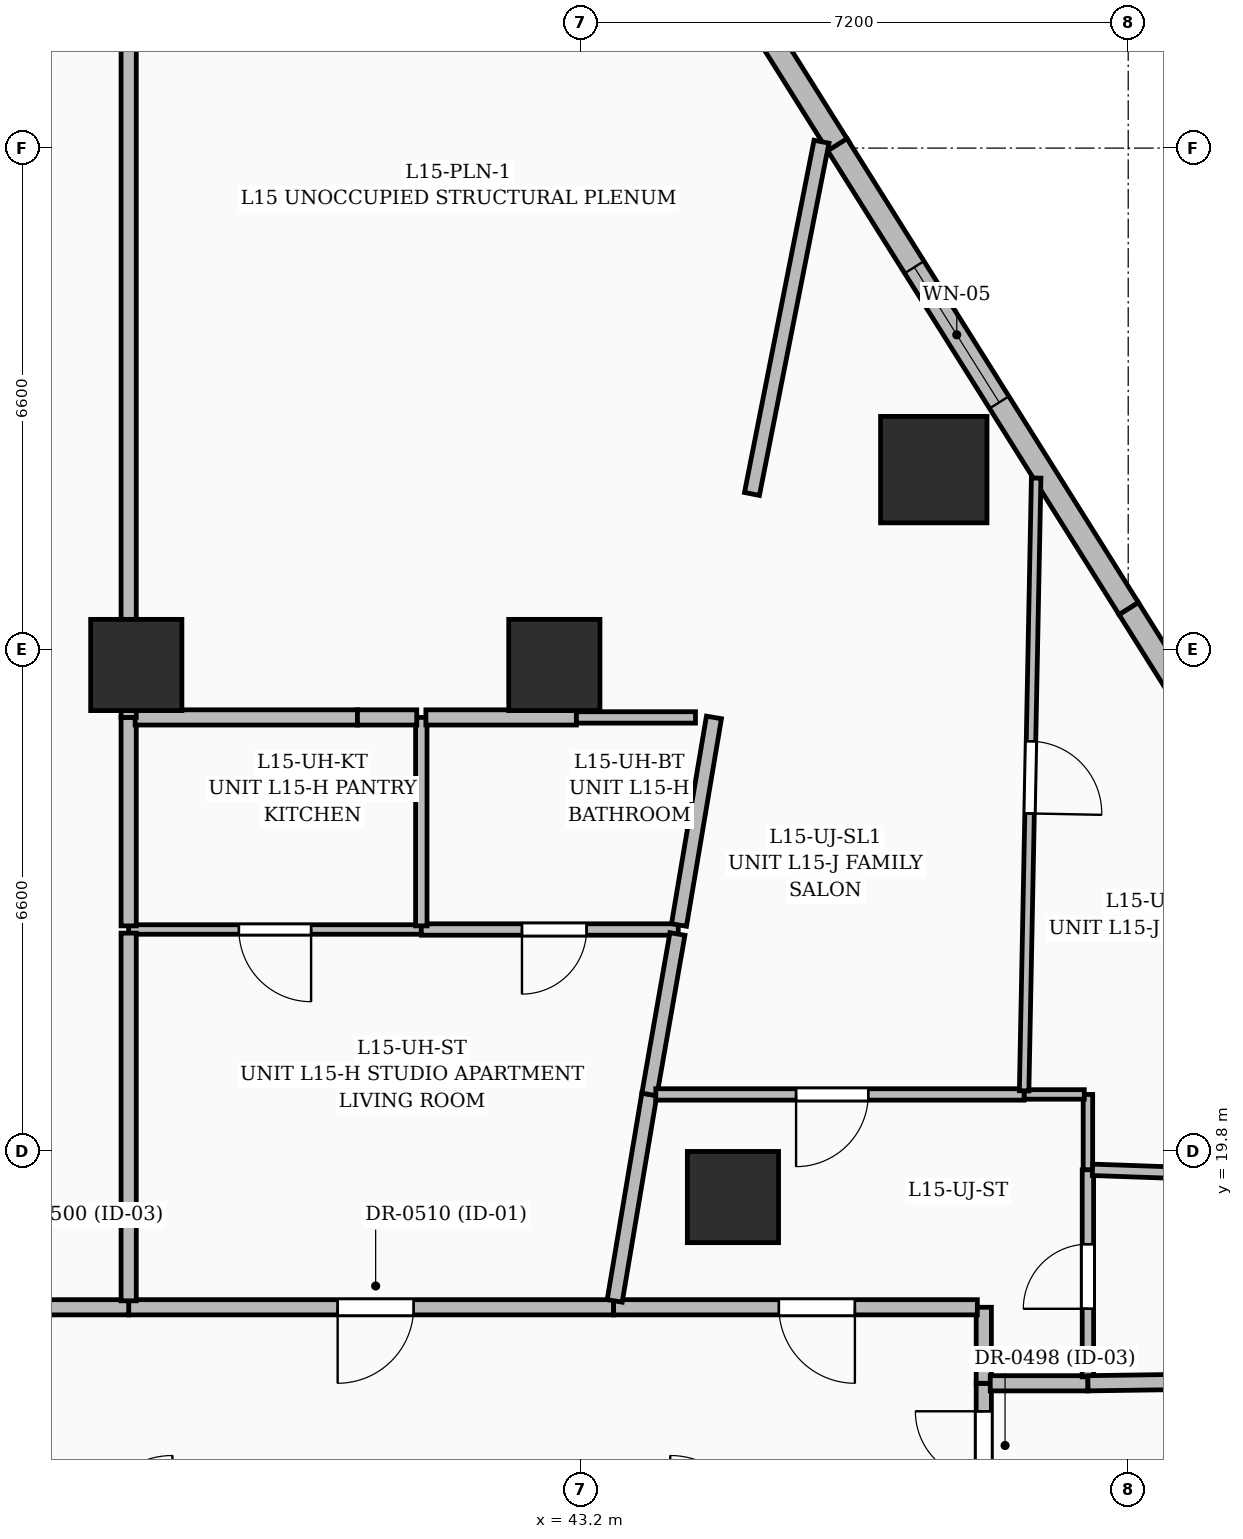
"""IFC4 building model, lengths in metres.
Left out: names, types, materials, properties, quantities, classifications, styles, units other than length and angle.
Written with IfcOpenShell. Run it as: python <this file> out.ifc"""

import sys

from ifc_helpers import new_model, si_unit, direction, frame, frame_2d, origin, origin_2d, place, context, subcontext, project, spatial, rectangle, extrude, element, fill, save


model = new_model("IFC4")
c1 = context("Model", 3, precision=1e-05, world=origin(), true_north=direction((0.0, 1.0)))
c2 = subcontext(c1, "Body", "Model", "MODEL_VIEW")
j1 = project(units=[si_unit("LENGTHUNIT", "METRE"), si_unit("PLANEANGLEUNIT", "RADIAN")], contexts=[c1])
p1 = place(None, origin())
s1 = spatial("IfcSite", under=j1, at=p1, CompositionType="ELEMENT")
p2 = place(p1, origin())
s2 = spatial("IfcBuilding", under=s1, at=p2, CompositionType="ELEMENT")
p3 = place(p2, frame((0.0, 0.0, 64.2)))
s3 = spatial("IfcBuildingStorey", under=s2, at=p3, CompositionType="ELEMENT", Elevation=64.2)
for number, where, z_axis, x_axis in (
    (1, (45.2, 19.2, 0.0), (0.0, 0.0, 1.0), (1.0, 0.0, 0.0)),
    (2, (42.85, 26.2, 0.0), (0.0, 0.0, 1.0), (1.0, 0.0, 0.0)),
    (3, (37.35, 26.2, 0.0), (0.0, 0.0, 1.0), (1.0, 0.0, 0.0)),
):
    element("IfcColumn", number, at=place(p3, frame(where, z_axis=z_axis, x_axis=x_axis)), inside=s3, PredefinedType="COLUMN", context=c2, shape_type="SweptSolid", body=[
        extrude(rectangle(XDim=1.2, YDim=1.2, at=origin_2d()), origin(), (0.0, 0.0, 1.0), 3.6),
    ])
p4 = place(p3, frame((47.842, 28.77, 0.0), z_axis=(0.0, 0.0, 1.0), x_axis=(1.0, 0.0, 0.0)))
e4 = element("IfcColumn", 4, at=p4, inside=s3, PredefinedType="COLUMN", context=c2, shape_type="SweptSolid", body=[
    extrude(rectangle(XDim=1.4, YDim=1.4, at=origin_2d()), origin(), (0.0, 0.0, 1.0), 3.6),
])
p5 = place(p3, frame((42.797, 39.058, 0.0), z_axis=(0.0, 0.0, 1.0), x_axis=(0.531893353762, -0.846811348663, 0.0)))
e5 = element("IfcWall", 5, at=p5, inside=s3, PredefinedType="SOLIDWALL", context=c2, shape_type="SweptSolid", body=[
    extrude(rectangle(XDim=7.154, YDim=0.3, at=frame_2d((3.577, 0.0))), origin(), (0.0, 0.0, 1.0), 3.35),
])
p6 = place(p5, frame((2.825, 0.0, 0.6)))
e6 = element("IfcOpeningElement", 6, at=p6, cuts=e5, PredefinedType="OPENING", context=c2, shape_type="SweptSolid", body=[
    extrude(rectangle(XDim=2.4, YDim=2.1, at=frame_2d((1.2, 1.05))), frame((0.0, 0.16, 0.0), z_axis=(0.0, -1.0, 0.0), x_axis=(1.0, 0.0, 0.0)), (0.0, 0.0, 1.0), 0.32),
])
p7 = place(p3, frame((46.574, 33.044, 0.0), z_axis=(0.0, 0.0, 1.0), x_axis=(0.531903730452, -0.846804830839, 0.0)))
e7 = element("IfcWall", 7, at=p7, inside=s3, PredefinedType="SOLIDWALL", context=c2, shape_type="SweptSolid", body=[
    extrude(rectangle(XDim=7.207, YDim=0.3, at=frame_2d((3.604, 0.0))), origin(), (0.0, 0.0, 1.0), 3.35),
])
p8 = place(p7, frame((1.903, 0.0, 0.55)))
e8 = element("IfcOpeningElement", 8, at=p8, cuts=e7, PredefinedType="OPENING", context=c2, shape_type="SweptSolid", body=[
    extrude(rectangle(XDim=2.1, YDim=2.4, at=frame_2d((1.05, 1.2))), frame((0.0, 0.16, 0.0), z_axis=(0.0, -1.0, 0.0), x_axis=(1.0, 0.0, 0.0)), (0.0, 0.0, 1.0), 0.32),
])
p9 = place(p3, frame((50.407, 26.941, 0.0), z_axis=(0.0, 0.0, 1.0), x_axis=(0.531893353762, -0.846811348663, 0.0)))
e9 = element("IfcWall", 9, at=p9, inside=s3, PredefinedType="SOLIDWALL", context=c2, shape_type="SweptSolid", body=[
    extrude(rectangle(XDim=7.154, YDim=0.3, at=frame_2d((3.577, 0.0))), origin(), (0.0, 0.0, 1.0), 3.35),
])
p10 = place(p9, frame((2.625, 0.0, 0.6)))
e10 = element("IfcOpeningElement", 10, at=p10, cuts=e9, PredefinedType="OPENING", context=c2, shape_type="SweptSolid", body=[
    extrude(rectangle(XDim=1.8, YDim=2.1, at=frame_2d((0.9, 1.05))), frame((0.0, 0.16, 0.0), z_axis=(0.0, -1.0, 0.0), x_axis=(1.0, 0.0, 0.0)), (0.0, 0.0, 1.0), 0.32),
])
p11 = place(p3, frame((48.5, 14.285, 0.0), z_axis=(0.0, 0.0, 1.0), x_axis=(0.0, 1.0, 0.0)))
e11 = element("IfcWall", 11, at=p11, inside=s3, PredefinedType="PARTITIONING", context=c2, shape_type="SweptSolid", body=[
    extrude(rectangle(XDim=2.465, YDim=0.2, at=frame_2d((1.232, 0.0))), origin(), (0.0, 0.0, 1.0), 2.279),
])
p12 = place(p11, frame((1.197, 0.0, 0.0)))
e12 = element("IfcOpeningElement", 12, at=p12, cuts=e11, PredefinedType="OPENING", context=c2, shape_type="SweptSolid", body=[
    extrude(rectangle(XDim=0.9, YDim=2.1, at=frame_2d((0.45, 1.05))), frame((0.0, 0.11, 0.0), z_axis=(0.0, -1.0, 0.0), x_axis=(1.0, 0.0, 0.0)), (0.0, 0.0, 1.0), 0.22),
])
p13 = place(p3, frame((43.63, 17.75, 0.0), z_axis=(0.0, 0.0, 1.0), x_axis=(-1.0, 0.0, 0.0)))
e13 = element("IfcWall", 13, at=p13, inside=s3, PredefinedType="PARTITIONING", context=c2, shape_type="SweptSolid", body=[
    extrude(rectangle(XDim=6.38, YDim=0.2, at=frame_2d((3.19, 0.0))), origin(), (0.0, 0.0, 1.0), 3.35),
])
p14 = place(p13, frame((2.631, 0.0, 0.0)))
e14 = element("IfcOpeningElement", 14, at=p14, cuts=e13, PredefinedType="OPENING", context=c2, shape_type="SweptSolid", body=[
    extrude(rectangle(XDim=1.0, YDim=2.2, at=frame_2d((0.5, 1.1))), frame((0.0, 0.11, 0.0), z_axis=(0.0, -1.0, 0.0), x_axis=(1.0, 0.0, 0.0)), (0.0, 0.0, 1.0), 0.22),
])
p15 = place(p3, frame((48.5, 16.75, 0.0), z_axis=(0.0, 0.0, 1.0), x_axis=(0.0, 1.0, 0.0)))
e15 = element("IfcWall", 15, at=p15, inside=s3, PredefinedType="PARTITIONING", context=c2, shape_type="SweptSolid", body=[
    extrude(rectangle(XDim=1.0, YDim=0.2, at=frame_2d((0.5, 0.0))), origin(), (0.0, 0.0, 1.0), 2.279),
])
p16 = place(p3, frame((48.415, 17.75, 0.0), z_axis=(0.0, 0.0, 1.0), x_axis=(-1.0, 0.0, 0.0)))
e16 = element("IfcWall", 16, at=p16, inside=s3, PredefinedType="PARTITIONING", context=c2, shape_type="SweptSolid", body=[
    extrude(rectangle(XDim=4.785, YDim=0.2, at=frame_2d((2.393, 0.0))), origin(), (0.0, 0.0, 1.0), 2.309),
])
p17 = place(p16, frame((1.611, 0.0, 0.0)))
e17 = element("IfcOpeningElement", 17, at=p17, cuts=e16, PredefinedType="OPENING", context=c2, shape_type="SweptSolid", body=[
    extrude(rectangle(XDim=1.0, YDim=2.2, at=frame_2d((0.5, 1.1))), frame((0.0, 0.11, 0.0), z_axis=(0.0, -1.0, 0.0), x_axis=(1.0, 0.0, 0.0)), (0.0, 0.0, 1.0), 0.22),
])
p18 = place(p3, frame((37.25, 17.75, 0.0), z_axis=(0.0, 0.0, 1.0), x_axis=(-1.0, 0.0, 0.0)))
e18 = element("IfcWall", 18, at=p18, inside=s3, PredefinedType="PARTITIONING", context=c2, shape_type="SweptSolid", body=[
    extrude(rectangle(XDim=3.19, YDim=0.2, at=frame_2d((1.595, 0.0))), origin(), (0.0, 0.0, 1.0), 2.309),
])
p19 = place(p18, frame((1.086, 0.0, 0.0)))
e19 = element("IfcOpeningElement", 19, at=p19, cuts=e18, PredefinedType="OPENING", context=c2, shape_type="SweptSolid", body=[
    extrude(rectangle(XDim=0.9, YDim=2.1, at=frame_2d((0.45, 1.05))), frame((0.0, 0.11, 0.0), z_axis=(0.0, -1.0, 0.0), x_axis=(1.0, 0.0, 0.0)), (0.0, 0.0, 1.0), 0.22),
])
p20 = place(p3, frame((49.87, 16.75, 0.0), z_axis=(0.0, 0.0, 1.0), x_axis=(-1.0, 0.0, 0.0)))
e20 = element("IfcWall", 20, at=p20, inside=s3, PredefinedType="PARTITIONING", context=c2, shape_type="SweptSolid", body=[
    extrude(rectangle(XDim=1.285, YDim=0.2, at=frame_2d((0.643, 0.0))), origin(), (0.0, 0.0, 1.0), 2.279),
])
p21 = place(p3, frame((41.1, 22.72, 0.0), z_axis=(0.0, 0.0, 1.0), x_axis=(-1.0, 0.0, 0.0)))
e21 = element("IfcWall", 21, at=p21, inside=s3, PredefinedType="PARTITIONING", context=c2, shape_type="SweptSolid", body=[
    extrude(rectangle(XDim=3.85, YDim=0.125, at=frame_2d((1.925, 0.0))), origin(), (0.0, 0.0, 1.0), 3.35),
])
p22 = place(p21, frame((1.45, 0.0, 0.0)))
e22 = element("IfcOpeningElement", 22, at=p22, cuts=e21, PredefinedType="OPENING", context=c2, shape_type="SweptSolid", body=[
    extrude(rectangle(XDim=0.95, YDim=2.2, at=frame_2d((0.475, 1.1))), frame((0.0, 0.072, 0.0), z_axis=(0.0, -1.0, 0.0), x_axis=(1.0, 0.0, 0.0)), (0.0, 0.0, 1.0), 0.145),
])
p23 = place(p3, frame((44.48, 22.72, 0.0), z_axis=(0.0, 0.0, 1.0), x_axis=(-1.0, 0.0, 0.0)))
e23 = element("IfcWall", 23, at=p23, inside=s3, PredefinedType="PARTITIONING", context=c2, shape_type="SweptSolid", body=[
    extrude(rectangle(XDim=3.38, YDim=0.15, at=frame_2d((1.69, 0.0))), origin(), (0.0, 0.0, 1.0), 2.309),
])
p24 = place(p23, frame((1.206, 0.0, 0.0)))
e24 = element("IfcOpeningElement", 24, at=p24, cuts=e23, PredefinedType="OPENING", context=c2, shape_type="SweptSolid", body=[
    extrude(rectangle(XDim=0.85, YDim=2.1, at=frame_2d((0.425, 1.05))), frame((0.0, 0.085, 0.0), z_axis=(0.0, -1.0, 0.0), x_axis=(1.0, 0.0, 0.0)), (0.0, 0.0, 1.0), 0.17),
])
p25 = place(p3, frame((43.644, 17.834, 0.0), z_axis=(0.0, 0.0, 1.0), x_axis=(0.165577528193, 0.986196776591, 0.0)))
e25 = element("IfcWall", 25, at=p25, inside=s3, PredefinedType="PARTITIONING", context=c2, shape_type="SweptSolid", body=[
    extrude(rectangle(XDim=2.754, YDim=0.2, at=frame_2d((1.377, 0.0))), origin(), (0.0, 0.0, 1.0), 3.35),
])
p26 = place(p3, frame((44.1, 20.55, 0.0), z_axis=(0.0, 0.0, 1.0), x_axis=(0.17248534527, 0.985012084021, 0.0)))
e26 = element("IfcWall", 26, at=p26, inside=s3, PredefinedType="PARTITIONING", context=c2, shape_type="SweptSolid", body=[
    extrude(rectangle(XDim=2.143, YDim=0.2, at=frame_2d((1.072, 0.0))), origin(), (0.0, 0.0, 1.0), 2.309),
])
p27 = place(p3, frame((37.25, 22.673, 0.0), z_axis=(0.0, 0.0, 1.0), x_axis=(0.0, -1.0, 0.0)))
e27 = element("IfcWall", 27, at=p27, inside=s3, PredefinedType="PARTITIONING", context=c2, shape_type="SweptSolid", body=[
    extrude(rectangle(XDim=4.838, YDim=0.2, at=frame_2d((2.419, 0.0))), origin(), (0.0, 0.0, 1.0), 3.35),
])
p28 = place(p3, frame((41.1, 22.768, 0.0), z_axis=(0.0, 0.0, 1.0), x_axis=(0.0, 1.0, 0.0)))
e28 = element("IfcWall", 28, at=p28, inside=s3, PredefinedType="PARTITIONING", context=c2, shape_type="SweptSolid", body=[
    extrude(rectangle(XDim=2.742, YDim=0.15, at=frame_2d((1.371, 0.0))), origin(), (0.0, 0.0, 1.0), 3.35),
])
p29 = place(p3, frame((37.25, 25.51, 0.0), z_axis=(0.0, 0.0, 1.0), x_axis=(0.0, -1.0, 0.0)))
e29 = element("IfcWall", 29, at=p29, inside=s3, PredefinedType="PARTITIONING", context=c2, shape_type="SweptSolid", body=[
    extrude(rectangle(XDim=2.742, YDim=0.2, at=frame_2d((1.371, 0.0))), origin(), (0.0, 0.0, 1.0), 2.309),
])
p30 = place(p3, frame((40.26, 25.51, 0.0), z_axis=(0.0, 0.0, 1.0), x_axis=(-1.0, 0.0, 0.0)))
e30 = element("IfcWall", 30, at=p30, inside=s3, PredefinedType="PARTITIONING", context=c2, shape_type="SweptSolid", body=[
    extrude(rectangle(XDim=2.925, YDim=0.2, at=frame_2d((1.462, 0.0))), origin(), (0.0, 0.0, 1.0), 3.35),
])
p31 = place(p3, frame((44.49, 22.779, 0.0), z_axis=(0.0, 0.0, 1.0), x_axis=(0.166100060311, 0.986108903704, 0.0)))
e31 = element("IfcWall", 31, at=p31, inside=s3, PredefinedType="PARTITIONING", context=c2, shape_type="SweptSolid", body=[
    extrude(rectangle(XDim=2.769, YDim=0.2, at=frame_2d((1.385, 0.0))), origin(), (0.0, 0.0, 1.0), 3.35),
])
p32 = place(p3, frame((43.14, 25.51, 0.0), z_axis=(0.0, 0.0, 1.0), x_axis=(-1.0, 0.0, 0.0)))
e32 = element("IfcWall", 32, at=p32, inside=s3, PredefinedType="PARTITIONING", context=c2, shape_type="SweptSolid", body=[
    extrude(rectangle(XDim=1.98, YDim=0.2, at=frame_2d((0.99, 0.0))), origin(), (0.0, 0.0, 1.0), 2.309),
])
p33 = place(p3, frame((49.87, 16.835, 0.0), z_axis=(0.0, 0.0, 1.0), x_axis=(0.0, 1.0, 0.0)))
e33 = element("IfcWall", 33, at=p33, inside=s3, PredefinedType="PARTITIONING", context=c2, shape_type="SweptSolid", body=[
    extrude(rectangle(XDim=2.725, YDim=0.15, at=frame_2d((1.363, 0.0))), origin(), (0.0, 0.0, 1.0), 2.279),
])
p34 = place(p33, frame((0.895, 0.0, 0.0)))
e34 = element("IfcOpeningElement", 34, at=p34, cuts=e33, PredefinedType="OPENING", context=c2, shape_type="SweptSolid", body=[
    extrude(rectangle(XDim=0.85, YDim=2.1, at=frame_2d((0.425, 1.05))), frame((0.0, 0.085, 0.0), z_axis=(0.0, -1.0, 0.0), x_axis=(1.0, 0.0, 0.0)), (0.0, 0.0, 1.0), 0.17),
])
p35 = place(p3, frame((49.87, 19.56, 0.0), z_axis=(0.0, 0.0, 1.0), x_axis=(0.0, 1.0, 0.0)))
e35 = element("IfcWall", 35, at=p35, inside=s3, PredefinedType="PARTITIONING", context=c2, shape_type="SweptSolid", body=[
    extrude(rectangle(XDim=0.99, YDim=0.125, at=frame_2d((0.495, 0.0))), origin(), (0.0, 0.0, 1.0), 3.35),
])
p36 = place(p3, frame((49.823, 20.55, 0.0), z_axis=(0.0, 0.0, 1.0), x_axis=(-1.0, 0.0, 0.0)))
e36 = element("IfcWall", 36, at=p36, inside=s3, PredefinedType="PARTITIONING", context=c2, shape_type="SweptSolid", body=[
    extrude(rectangle(XDim=0.792, YDim=0.125, at=frame_2d((0.396, 0.0))), origin(), (0.0, 0.0, 1.0), 3.35),
])
p37 = place(p3, frame((49.03, 20.55, 0.0), z_axis=(0.0, 0.0, 1.0), x_axis=(-1.0, 0.0, 0.0)))
e37 = element("IfcWall", 37, at=p37, inside=s3, PredefinedType="PARTITIONING", context=c2, shape_type="SweptSolid", body=[
    extrude(rectangle(XDim=4.845, YDim=0.15, at=frame_2d((2.422, 0.0))), origin(), (0.0, 0.0, 1.0), 2.279),
])
p38 = place(p37, frame((2.05, 0.0, 0.0)))
e38 = element("IfcOpeningElement", 38, at=p38, cuts=e37, PredefinedType="OPENING", context=c2, shape_type="SweptSolid", body=[
    extrude(rectangle(XDim=0.95, YDim=2.2, at=frame_2d((0.475, 1.1))), frame((0.0, 0.085, 0.0), z_axis=(0.0, -1.0, 0.0), x_axis=(1.0, 0.0, 0.0)), (0.0, 0.0, 1.0), 0.17),
])
p39 = place(p3, frame((52.861, 19.456, 0.0), z_axis=(0.0, 0.0, 1.0), x_axis=(-0.999391578041, 0.034877983608, 0.0)))
e39 = element("IfcWall", 39, at=p39, inside=s3, PredefinedType="PARTITIONING", context=c2, shape_type="SweptSolid", body=[
    extrude(rectangle(XDim=2.933, YDim=0.15, at=frame_2d((1.466, 0.0))), origin(), (0.0, 0.0, 1.0), 2.279),
])
p40 = place(p3, frame((49.189, 28.659, 0.0), z_axis=(0.0, 0.0, 1.0), x_axis=(-0.019620692223, -0.999807495689, 0.0)))
e40 = element("IfcWall", 40, at=p40, inside=s3, PredefinedType="PARTITIONING", context=c2, shape_type="SweptSolid", body=[
    extrude(rectangle(XDim=8.063, YDim=0.125, at=frame_2d((4.031, 0.0))), origin(), (0.0, 0.0, 1.0), 2.37),
])
p41 = place(p40, frame((3.463, 0.0, 0.0)))
e41 = element("IfcOpeningElement", 41, at=p41, cuts=e40, PredefinedType="OPENING", context=c2, shape_type="SweptSolid", body=[
    extrude(rectangle(XDim=0.95, YDim=2.2, at=frame_2d((0.475, 1.1))), frame((0.0, 0.072, 0.0), z_axis=(0.0, -1.0, 0.0), x_axis=(1.0, 0.0, 0.0)), (0.0, 0.0, 1.0), 0.145),
])
p42 = place(p3, frame((46.365, 33.084, 0.0), z_axis=(0.0, 0.0, 1.0), x_axis=(-0.193720090738, -0.981056841597, 0.0)))
e42 = element("IfcWall", 42, at=p42, inside=s3, PredefinedType="PARTITIONING", context=c2, shape_type="SweptSolid", body=[
    extrude(rectangle(XDim=4.724, YDim=0.2, at=frame_2d((2.362, 0.0))), origin(), (0.0, 0.0, 1.0), 2.37),
])
p43 = place(p3, frame((37.25, 25.51, 0.0), z_axis=(0.0, 0.0, 1.0), x_axis=(0.0, 1.0, 0.0)))
e43 = element("IfcWall", 43, at=p43, inside=s3, PredefinedType="PARTITIONING", context=c2, shape_type="SweptSolid", body=[
    extrude(rectangle(XDim=12.14, YDim=0.2, at=frame_2d((6.07, 0.0))), origin(), (0.0, 0.0, 1.0), 2.279),
])
p44 = place(p3, frame((56.593, 16.846, 0.0), z_axis=(0.0, 0.0, 1.0), x_axis=(-0.999898174742, -0.014270253937, 0.0)))
e44 = element("IfcWall", 44, at=p44, inside=s3, PredefinedType="PARTITIONING", context=c2, shape_type="SweptSolid", body=[
    extrude(rectangle(XDim=6.724, YDim=0.2, at=frame_2d((3.362, 0.0))), origin(), (0.0, 0.0, 1.0), 2.37),
])
p45 = place(p3, frame((41.04, 25.51, 0.0), z_axis=(0.0, 0.0, 1.0), x_axis=(-1.0, 0.0, 0.0)))
e45 = element("IfcWall", 45, at=p45, inside=s3, PredefinedType="PARTITIONING", context=c2, shape_type="SweptSolid", body=[
    extrude(rectangle(XDim=0.78, YDim=0.2, at=frame_2d((0.39, 0.0))), origin(), (0.0, 0.0, 1.0), 3.35),
])
p46 = place(p3, frame((44.707, 25.51, 0.0), z_axis=(0.0, 0.0, 1.0), x_axis=(-1.0, 0.0, 0.0)))
e46 = element("IfcWall", 46, at=p46, inside=s3, PredefinedType="PARTITIONING", context=c2, shape_type="SweptSolid", body=[
    extrude(rectangle(XDim=1.567, YDim=0.15, at=frame_2d((0.784, 0.0))), origin(), (0.0, 0.0, 1.0), 2.309),
])
p47 = place(p8, origin())
e47 = element("IfcWindow", 47, at=p47, inside=s3, PartitioningType="SINGLE_PANEL", PredefinedType="WINDOW", context=c2, shape_type="SweptSolid", body=[
    extrude(rectangle(XDim=2.1, YDim=2.4, at=frame_2d((1.05, 1.2))), frame((0.0, 0.03, 0.0), z_axis=(0.0, -1.0, 0.0), x_axis=(1.0, 0.0, 0.0)), (0.0, 0.0, 1.0), 0.06),
])
fill(e8, e47)
p48 = place(p12, origin())
e48 = element("IfcDoor", 48, at=p48, inside=s3, OperationType="SINGLE_SWING_RIGHT", PredefinedType="DOOR", context=c2, shape_type="SweptSolid", body=[
    extrude(rectangle(XDim=0.9, YDim=2.1, at=frame_2d((0.45, 1.05))), frame((0.0, 0.025, 0.0), z_axis=(0.0, -1.0, 0.0), x_axis=(1.0, 0.0, 0.0)), (0.0, 0.0, 1.0), 0.05),
])
fill(e12, e48)
p49 = place(p14, origin())
e49 = element("IfcDoor", 49, at=p49, inside=s3, OperationType="SINGLE_SWING_RIGHT", PredefinedType="DOOR", context=c2, shape_type="SweptSolid", body=[
    extrude(rectangle(XDim=1.0, YDim=2.2, at=frame_2d((0.5, 1.1))), frame((0.0, 0.025, 0.0), z_axis=(0.0, -1.0, 0.0), x_axis=(1.0, 0.0, 0.0)), (0.0, 0.0, 1.0), 0.05),
])
fill(e14, e49)
p50 = place(p22, origin())
e50 = element("IfcDoor", 50, at=p50, inside=s3, OperationType="SINGLE_SWING_LEFT", PredefinedType="DOOR", context=c2, shape_type="SweptSolid", body=[
    extrude(rectangle(XDim=0.95, YDim=2.2, at=frame_2d((0.475, 1.1))), frame((0.0, 0.025, 0.0), z_axis=(0.0, -1.0, 0.0), x_axis=(1.0, 0.0, 0.0)), (0.0, 0.0, 1.0), 0.05),
])
fill(e22, e50)
p51 = place(p24, origin())
e51 = element("IfcDoor", 51, at=p51, inside=s3, OperationType="SINGLE_SWING_RIGHT", PredefinedType="DOOR", context=c2, shape_type="SweptSolid", body=[
    extrude(rectangle(XDim=0.85, YDim=2.1, at=frame_2d((0.425, 1.05))), frame((0.0, 0.025, 0.0), z_axis=(0.0, -1.0, 0.0), x_axis=(1.0, 0.0, 0.0)), (0.0, 0.0, 1.0), 0.05),
])
fill(e24, e51)
p52 = place(p17, origin())
e52 = element("IfcDoor", 52, at=p52, inside=s3, OperationType="SINGLE_SWING_LEFT", PredefinedType="DOOR", context=c2, shape_type="SweptSolid", body=[
    extrude(rectangle(XDim=1.0, YDim=2.2, at=frame_2d((0.5, 1.1))), frame((0.0, 0.025, 0.0), z_axis=(0.0, -1.0, 0.0), x_axis=(1.0, 0.0, 0.0)), (0.0, 0.0, 1.0), 0.05),
])
fill(e17, e52)
p53 = place(p41, origin())
e53 = element("IfcDoor", 53, at=p53, inside=s3, OperationType="SINGLE_SWING_RIGHT", PredefinedType="DOOR", context=c2, shape_type="SweptSolid", body=[
    extrude(rectangle(XDim=0.95, YDim=2.2, at=frame_2d((0.475, 1.1))), frame((0.0, 0.025, 0.0), z_axis=(0.0, -1.0, 0.0), x_axis=(1.0, 0.0, 0.0)), (0.0, 0.0, 1.0), 0.05),
])
fill(e41, e53)
p54 = place(p34, origin())
e54 = element("IfcDoor", 54, at=p54, inside=s3, OperationType="SINGLE_SWING_LEFT", PredefinedType="DOOR", context=c2, shape_type="SweptSolid", body=[
    extrude(rectangle(XDim=0.85, YDim=2.1, at=frame_2d((0.425, 1.05))), frame((0.0, 0.025, 0.0), z_axis=(0.0, -1.0, 0.0), x_axis=(1.0, 0.0, 0.0)), (0.0, 0.0, 1.0), 0.05),
])
fill(e34, e54)
p55 = place(p38, origin())
e55 = element("IfcDoor", 55, at=p55, inside=s3, OperationType="SINGLE_SWING_RIGHT", PredefinedType="DOOR", context=c2, shape_type="SweptSolid", body=[
    extrude(rectangle(XDim=0.95, YDim=2.2, at=frame_2d((0.475, 1.1))), frame((0.0, 0.025, 0.0), z_axis=(0.0, -1.0, 0.0), x_axis=(1.0, 0.0, 0.0)), (0.0, 0.0, 1.0), 0.05),
])
fill(e38, e55)
save(model, sys.argv[1])
